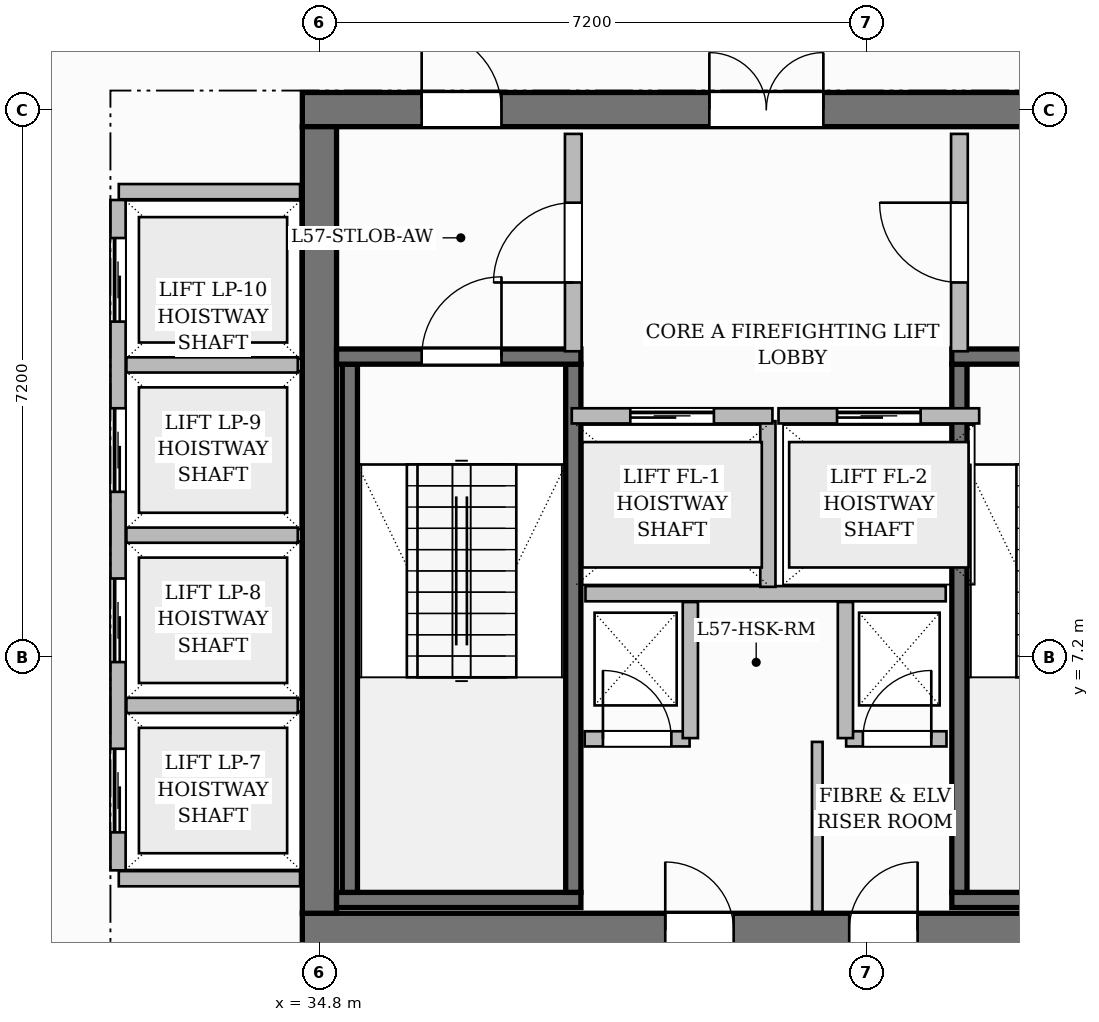
"""IFC4 building model, lengths in metres.
Left out: names, types, materials, properties, quantities, classifications, styles, units other than length and angle.
Written with IfcOpenShell. Run it as: python <this file> out.ifc"""

import sys

from ifc_helpers import new_model, si_unit, direction, frame, frame_2d, origin, place, context, subcontext, project, spatial, rectangle, extrude, source, transform, mapped, element, fill, save


model = new_model("IFC4")
c1 = context("Model", 3, precision=1e-05, world=origin(), true_north=direction((0.0, 1.0)))
c2 = subcontext(c1, "Body", "Model", "MODEL_VIEW")
j1 = project(units=[si_unit("LENGTHUNIT", "METRE"), si_unit("PLANEANGLEUNIT", "RADIAN")], contexts=[c1])
p1 = place(None, origin())
s1 = spatial("IfcSite", under=j1, at=p1, CompositionType="ELEMENT")
p2 = place(p1, origin())
s2 = spatial("IfcBuilding", under=s1, at=p2, CompositionType="ELEMENT")
p3 = place(p2, frame((0.0, 0.0, 228.85)))
s3 = spatial("IfcBuildingStorey", under=s2, at=p3, CompositionType="ELEMENT", Elevation=228.85)
p4 = place(p3, frame((34.575, 3.6, 0.0), z_axis=(0.0, 0.0, 1.0), x_axis=(1.0, 0.0, 0.0)))
e1 = element("IfcWall", 1, at=p4, inside=s3, PredefinedType="SHEAR", context=c2, shape_type="SweptSolid", body=[
    extrude(rectangle(XDim=15.45, YDim=0.45, at=frame_2d((7.725, 0.0))), origin(), (0.0, 0.0, 1.0), 3.85),
])
p5 = place(p4, frame((4.775, 0.0, 0.0)))
e2 = element("IfcOpeningElement", 2, at=p5, cuts=e1, PredefinedType="OPENING", context=c2, shape_type="SweptSolid", body=[
    extrude(rectangle(XDim=0.9, YDim=2.1, at=frame_2d((0.45, 1.05))), frame((0.0, 0.235, 0.0), z_axis=(0.0, -1.0, 0.0), x_axis=(1.0, 0.0, 0.0)), (0.0, 0.0, 1.0), 0.47),
])
p6 = place(p4, frame((7.195, 0.0, 0.0)))
e3 = element("IfcOpeningElement", 3, at=p6, cuts=e1, PredefinedType="OPENING", context=c2, shape_type="SweptSolid", body=[
    extrude(rectangle(XDim=0.9, YDim=2.1, at=frame_2d((0.45, 1.05))), frame((0.0, 0.235, 0.0), z_axis=(0.0, -1.0, 0.0), x_axis=(1.0, 0.0, 0.0)), (0.0, 0.0, 1.0), 0.47),
])
p7 = place(p3, frame((34.575, 14.4, 0.0), z_axis=(0.0, 0.0, 1.0), x_axis=(1.0, 0.0, 0.0)))
e4 = element("IfcWall", 4, at=p7, inside=s3, PredefinedType="SHEAR", context=c2, shape_type="SweptSolid", body=[
    extrude(rectangle(XDim=15.45, YDim=0.45, at=frame_2d((7.725, 0.0))), origin(), (0.0, 0.0, 1.0), 3.85),
])
p8 = place(p7, frame((5.355, 0.0, 0.0)))
e5 = element("IfcOpeningElement", 5, at=p8, cuts=e4, PredefinedType="OPENING", context=c2, shape_type="SweptSolid", body=[
    extrude(rectangle(XDim=1.5, YDim=2.2, at=frame_2d((0.75, 1.1))), frame((0.0, 0.235, 0.0), z_axis=(0.0, -1.0, 0.0), x_axis=(1.0, 0.0, 0.0)), (0.0, 0.0, 1.0), 0.47),
])
p9 = place(p7, frame((1.57, 0.0, 0.0)))
e6 = element("IfcOpeningElement", 6, at=p9, cuts=e4, PredefinedType="OPENING", context=c2, shape_type="SweptSolid", body=[
    extrude(rectangle(XDim=1.05, YDim=2.15, at=frame_2d((0.525, 1.075))), frame((0.0, 0.235, 0.0), z_axis=(0.0, -1.0, 0.0), x_axis=(1.0, 0.0, 0.0)), (0.0, 0.0, 1.0), 0.47),
])
p10 = place(p7, frame((11.2, 0.0, 0.0)))
e7 = element("IfcOpeningElement", 7, at=p10, cuts=e4, PredefinedType="OPENING", context=c2, shape_type="SweptSolid", body=[
    extrude(rectangle(XDim=1.05, YDim=2.15, at=frame_2d((0.525, 1.075))), frame((0.0, 0.235, 0.0), z_axis=(0.0, -1.0, 0.0), x_axis=(1.0, 0.0, 0.0)), (0.0, 0.0, 1.0), 0.47),
])
p11 = place(p3, frame((34.8, 3.825, 0.0), z_axis=(0.0, 0.0, 1.0), x_axis=(0.0, 1.0, 0.0)))
e8 = element("IfcWall", 8, at=p11, inside=s3, PredefinedType="SHEAR", context=c2, shape_type="SweptSolid", body=[
    extrude(rectangle(XDim=10.35, YDim=0.45, at=frame_2d((5.175, 0.0))), origin(), (0.0, 0.0, 1.0), 3.85),
])
p12 = place(p3, frame((35.025, 4.0, 0.0), z_axis=(0.0, 0.0, 1.0), x_axis=(1.0, 0.0, 0.0)))
e9 = element("IfcWall", 9, at=p12, inside=s3, PredefinedType="SHEAR", context=c2, shape_type="SweptSolid", body=[
    extrude(rectangle(XDim=3.215, YDim=0.2, at=frame_2d((1.607, 0.0))), origin(), (0.0, 0.0, 1.0), 3.85),
])
for number, where, z_axis, x_axis in (
    (10, (35.2, 4.1, 0.0), (0.0, 0.0, 1.0), (0.0, 1.0, 0.0)),
    (11, (38.14, 4.1, 0.0), (0.0, 0.0, 1.0), (0.0, 1.0, 0.0)),
):
    element("IfcWall", number, at=place(p3, frame(where, z_axis=z_axis, x_axis=x_axis)), inside=s3, PredefinedType="SHEAR", context=c2, shape_type="SweptSolid", body=[
        extrude(rectangle(XDim=6.95, YDim=0.2, at=frame_2d((3.475, 0.0))), origin(), (0.0, 0.0, 1.0), 3.85),
    ])
p13 = place(p3, frame((35.025, 11.15, 0.0), z_axis=(0.0, 0.0, 1.0), x_axis=(1.0, 0.0, 0.0)))
e12 = element("IfcWall", 12, at=p13, inside=s3, PredefinedType="SHEAR", context=c2, shape_type="SweptSolid", body=[
    extrude(rectangle(XDim=3.215, YDim=0.2, at=frame_2d((1.607, 0.0))), origin(), (0.0, 0.0, 1.0), 3.85),
])
p14 = place(p13, frame((1.12, 0.0, 0.0)))
e13 = element("IfcOpeningElement", 13, at=p14, cuts=e12, PredefinedType="OPENING", context=c2, shape_type="SweptSolid", body=[
    extrude(rectangle(XDim=1.05, YDim=2.2, at=frame_2d((0.525, 1.1))), frame((0.0, 0.11, 0.0), z_axis=(0.0, -1.0, 0.0), x_axis=(1.0, 0.0, 0.0)), (0.0, 0.0, 1.0), 0.22),
])
p15 = place(p3, frame((43.12, 4.0, 0.0), z_axis=(0.0, 0.0, 1.0), x_axis=(1.0, 0.0, 0.0)))
e14 = element("IfcWall", 14, at=p15, inside=s3, PredefinedType="SHEAR", context=c2, shape_type="SweptSolid", body=[
    extrude(rectangle(XDim=6.455, YDim=0.2, at=frame_2d((3.228, 0.0))), origin(), (0.0, 0.0, 1.0), 3.85),
])
p16 = place(p3, frame((43.22, 4.1, 0.0), z_axis=(0.0, 0.0, 1.0), x_axis=(0.0, 1.0, 0.0)))
e15 = element("IfcWall", 15, at=p16, inside=s3, PredefinedType="SHEAR", context=c2, shape_type="SweptSolid", body=[
    extrude(rectangle(XDim=6.95, YDim=0.2, at=frame_2d((3.475, 0.0))), origin(), (0.0, 0.0, 1.0), 3.85),
])
p17 = place(p3, frame((43.12, 11.15, 0.0), z_axis=(0.0, 0.0, 1.0), x_axis=(1.0, 0.0, 0.0)))
e16 = element("IfcWall", 16, at=p17, inside=s3, PredefinedType="SHEAR", context=c2, shape_type="SweptSolid", body=[
    extrude(rectangle(XDim=6.455, YDim=0.2, at=frame_2d((3.228, 0.0))), origin(), (0.0, 0.0, 1.0), 3.85),
])
p18 = place(p17, frame((1.045, 0.0, 0.0)))
e17 = element("IfcOpeningElement", 17, at=p18, cuts=e16, PredefinedType="OPENING", context=c2, shape_type="SweptSolid", body=[
    extrude(rectangle(XDim=1.05, YDim=2.2, at=frame_2d((0.525, 1.1))), frame((0.0, 0.11, 0.0), z_axis=(0.0, -1.0, 0.0), x_axis=(1.0, 0.0, 0.0)), (0.0, 0.0, 1.0), 0.22),
])
p19 = place(p17, frame((4.125, 0.0, 0.0)))
e18 = element("IfcOpeningElement", 18, at=p19, cuts=e16, PredefinedType="OPENING", context=c2, shape_type="SweptSolid", body=[
    extrude(rectangle(XDim=1.05, YDim=2.2, at=frame_2d((0.525, 1.1))), frame((0.0, 0.11, 0.0), z_axis=(0.0, -1.0, 0.0), x_axis=(1.0, 0.0, 0.0)), (0.0, 0.0, 1.0), 0.22),
])
p20 = place(p3, frame((38.3, 8.03, 0.0), z_axis=(0.0, 0.0, 1.0), x_axis=(1.0, 0.0, 0.0)))
e19 = element("IfcWall", 19, at=p20, inside=s3, PredefinedType="PARTITIONING", context=c2, shape_type="SweptSolid", body=[
    extrude(rectangle(XDim=4.74, YDim=0.2, at=frame_2d((2.37, 0.0))), origin(), (0.0, 0.0, 1.0), 3.6),
])
p21 = place(p3, frame((40.7, 8.12, 0.0), z_axis=(0.0, 0.0, 1.0), x_axis=(0.0, 1.0, 0.0)))
e20 = element("IfcWall", 20, at=p21, inside=s3, PredefinedType="PARTITIONING", context=c2, shape_type="SweptSolid", body=[
    extrude(rectangle(XDim=2.18, YDim=0.2, at=frame_2d((1.09, 0.0))), origin(), (0.0, 0.0, 1.0), 3.6),
])
p22 = place(p3, frame((38.14, 11.22, 0.0), z_axis=(0.0, 0.0, 1.0), x_axis=(0.0, 1.0, 0.0)))
e21 = element("IfcWall", 21, at=p22, inside=s3, PredefinedType="PARTITIONING", context=c2, shape_type="SweptSolid", body=[
    extrude(rectangle(XDim=2.86, YDim=0.22, at=frame_2d((1.43, 0.0))), origin(), (0.0, 0.0, 1.0), 3.6),
])
p23 = place(p22, frame((0.905, 0.0, 0.0)))
e22 = element("IfcOpeningElement", 22, at=p23, cuts=e21, PredefinedType="OPENING", context=c2, shape_type="SweptSolid", body=[
    extrude(rectangle(XDim=1.05, YDim=2.15, at=frame_2d((0.525, 1.075))), frame((0.0, 0.12, 0.0), z_axis=(0.0, -1.0, 0.0), x_axis=(1.0, 0.0, 0.0)), (0.0, 0.0, 1.0), 0.24),
])
p24 = place(p3, frame((43.22, 11.22, 0.0), z_axis=(0.0, 0.0, 1.0), x_axis=(0.0, 1.0, 0.0)))
e23 = element("IfcWall", 23, at=p24, inside=s3, PredefinedType="PARTITIONING", context=c2, shape_type="SweptSolid", body=[
    extrude(rectangle(XDim=2.86, YDim=0.22, at=frame_2d((1.43, 0.0))), origin(), (0.0, 0.0, 1.0), 3.6),
])
p25 = place(p24, frame((0.905, 0.0, 0.0)))
e24 = element("IfcOpeningElement", 24, at=p25, cuts=e23, PredefinedType="OPENING", context=c2, shape_type="SweptSolid", body=[
    extrude(rectangle(XDim=1.05, YDim=2.15, at=frame_2d((0.525, 1.075))), frame((0.0, 0.12, 0.0), z_axis=(0.0, -1.0, 0.0), x_axis=(1.0, 0.0, 0.0)), (0.0, 0.0, 1.0), 0.24),
])
p26 = place(p3, frame((38.29, 6.12, 0.0), z_axis=(0.0, 0.0, 1.0), x_axis=(1.0, 0.0, 0.0)))
e25 = element("IfcWall", 25, at=p26, inside=s3, PredefinedType="PARTITIONING", context=c2, shape_type="SweptSolid", body=[
    extrude(rectangle(XDim=1.38, YDim=0.2, at=frame_2d((0.69, 0.0))), origin(), (0.0, 0.0, 1.0), 3.6),
])
p27 = place(p26, frame((0.24, 0.0, 0.0)))
e26 = element("IfcOpeningElement", 26, at=p27, cuts=e25, PredefinedType="OPENING", context=c2, shape_type="SweptSolid", body=[
    extrude(rectangle(XDim=0.9, YDim=2.1, at=frame_2d((0.45, 1.05))), frame((0.0, 0.11, 0.0), z_axis=(0.0, -1.0, 0.0), x_axis=(1.0, 0.0, 0.0)), (0.0, 0.0, 1.0), 0.22),
])
p28 = place(p3, frame((39.68, 6.13, 0.0), z_axis=(0.0, 0.0, 1.0), x_axis=(0.0, 1.0, 0.0)))
e27 = element("IfcWall", 27, at=p28, inside=s3, PredefinedType="PARTITIONING", context=c2, shape_type="SweptSolid", body=[
    extrude(rectangle(XDim=1.79, YDim=0.2, at=frame_2d((0.895, 0.0))), origin(), (0.0, 0.0, 1.0), 3.6),
])
p29 = place(p3, frame((41.73, 6.12, 0.0), z_axis=(0.0, 0.0, 1.0), x_axis=(1.0, 0.0, 0.0)))
e28 = element("IfcWall", 28, at=p29, inside=s3, PredefinedType="PARTITIONING", context=c2, shape_type="SweptSolid", body=[
    extrude(rectangle(XDim=1.32, YDim=0.2, at=frame_2d((0.66, 0.0))), origin(), (0.0, 0.0, 1.0), 3.6),
])
p30 = place(p29, frame((0.22, 0.0, 0.0)))
e29 = element("IfcOpeningElement", 29, at=p30, cuts=e28, PredefinedType="OPENING", context=c2, shape_type="SweptSolid", body=[
    extrude(rectangle(XDim=0.9, YDim=2.1, at=frame_2d((0.45, 1.05))), frame((0.0, 0.11, 0.0), z_axis=(0.0, -1.0, 0.0), x_axis=(1.0, 0.0, 0.0)), (0.0, 0.0, 1.0), 0.22),
])
p31 = place(p3, frame((41.72, 6.13, 0.0), z_axis=(0.0, 0.0, 1.0), x_axis=(0.0, 1.0, 0.0)))
e30 = element("IfcWall", 30, at=p31, inside=s3, PredefinedType="PARTITIONING", context=c2, shape_type="SweptSolid", body=[
    extrude(rectangle(XDim=1.79, YDim=0.2, at=frame_2d((0.895, 0.0))), origin(), (0.0, 0.0, 1.0), 3.6),
])
p32 = place(p3, frame((41.35, 3.845, 0.0), z_axis=(0.0, 0.0, 1.0), x_axis=(0.0, 1.0, 0.0)))
e31 = element("IfcWall", 31, at=p32, inside=s3, PredefinedType="PARTITIONING", context=c2, shape_type="SweptSolid", body=[
    extrude(rectangle(XDim=2.235, YDim=0.14, at=frame_2d((1.118, 0.0))), origin(), (0.0, 0.0, 1.0), 3.6),
])
for number, where, z_axis, x_axis in (
    (32, (32.16, 4.28, 0.0), (0.0, 0.0, 1.0), (1.0, 0.0, 0.0)),
    (33, (32.16, 13.32, 0.0), (0.0, 0.0, 1.0), (1.0, 0.0, 0.0)),
):
    element("IfcWall", number, at=place(p3, frame(where, z_axis=z_axis, x_axis=x_axis)), inside=s3, PredefinedType="PARTITIONING", context=c2, shape_type="SweptSolid", body=[
        extrude(rectangle(XDim=2.385, YDim=0.2, at=frame_2d((1.192, 0.0))), origin(), (0.0, 0.0, 1.0), 3.6),
    ])
p33 = place(p3, frame((32.15, 4.39, 0.0), z_axis=(0.0, 0.0, 1.0), x_axis=(0.0, 1.0, 0.0)))
e34 = element("IfcWall", 34, at=p33, inside=s3, PredefinedType="PARTITIONING", context=c2, shape_type="SweptSolid", body=[
    extrude(rectangle(XDim=8.82, YDim=0.2, at=frame_2d((4.41, 0.0))), origin(), (0.0, 0.0, 1.0), 3.6),
])
p34 = place(p33, frame((0.5, 0.0, 0.0)))
e35 = element("IfcOpeningElement", 35, at=p34, cuts=e34, PredefinedType="OPENING", context=c2, shape_type="SweptSolid", body=[
    extrude(rectangle(XDim=1.1, YDim=2.2, at=frame_2d((0.55, 1.1))), frame((0.0, 0.11, 0.0), z_axis=(0.0, -1.0, 0.0), x_axis=(1.0, 0.0, 0.0)), (0.0, 0.0, 1.0), 0.22),
])
p35 = place(p33, frame((2.74, 0.0, 0.0)))
e36 = element("IfcOpeningElement", 36, at=p35, cuts=e34, PredefinedType="OPENING", context=c2, shape_type="SweptSolid", body=[
    extrude(rectangle(XDim=1.1, YDim=2.2, at=frame_2d((0.55, 1.1))), frame((0.0, 0.11, 0.0), z_axis=(0.0, -1.0, 0.0), x_axis=(1.0, 0.0, 0.0)), (0.0, 0.0, 1.0), 0.22),
])
p36 = place(p33, frame((4.98, 0.0, 0.0)))
e37 = element("IfcOpeningElement", 37, at=p36, cuts=e34, PredefinedType="OPENING", context=c2, shape_type="SweptSolid", body=[
    extrude(rectangle(XDim=1.1, YDim=2.2, at=frame_2d((0.55, 1.1))), frame((0.0, 0.11, 0.0), z_axis=(0.0, -1.0, 0.0), x_axis=(1.0, 0.0, 0.0)), (0.0, 0.0, 1.0), 0.22),
])
p37 = place(p33, frame((7.22, 0.0, 0.0)))
e38 = element("IfcOpeningElement", 38, at=p37, cuts=e34, PredefinedType="OPENING", context=c2, shape_type="SweptSolid", body=[
    extrude(rectangle(XDim=1.1, YDim=2.2, at=frame_2d((0.55, 1.1))), frame((0.0, 0.11, 0.0), z_axis=(0.0, -1.0, 0.0), x_axis=(1.0, 0.0, 0.0)), (0.0, 0.0, 1.0), 0.22),
])
for number, where, z_axis, x_axis in (
    (39, (32.26, 6.56, 0.0), (0.0, 0.0, 1.0), (1.0, 0.0, 0.0)),
    (40, (32.26, 8.8, 0.0), (0.0, 0.0, 1.0), (1.0, 0.0, 0.0)),
    (41, (32.26, 11.04, 0.0), (0.0, 0.0, 1.0), (1.0, 0.0, 0.0)),
):
    element("IfcWall", number, at=place(p3, frame(where, z_axis=z_axis, x_axis=x_axis)), inside=s3, PredefinedType="PARTITIONING", context=c2, shape_type="SweptSolid", body=[
        extrude(rectangle(XDim=2.255, YDim=0.2, at=frame_2d((1.127, 0.0))), origin(), (0.0, 0.0, 1.0), 3.6),
    ])
p38 = place(p3, frame((38.12, 10.37, 0.0), z_axis=(0.0, 0.0, 1.0), x_axis=(1.0, 0.0, 0.0)))
e42 = element("IfcWall", 42, at=p38, inside=s3, PredefinedType="PARTITIONING", context=c2, shape_type="SweptSolid", body=[
    extrude(rectangle(XDim=2.64, YDim=0.2, at=frame_2d((1.32, 0.0))), origin(), (0.0, 0.0, 1.0), 3.6),
])
p39 = place(p38, frame((0.77, 0.0, 0.0)))
e43 = element("IfcOpeningElement", 43, at=p39, cuts=e42, PredefinedType="OPENING", context=c2, shape_type="SweptSolid", body=[
    extrude(rectangle(XDim=1.1, YDim=2.2, at=frame_2d((0.55, 1.1))), frame((0.0, 0.11, 0.0), z_axis=(0.0, -1.0, 0.0), x_axis=(1.0, 0.0, 0.0)), (0.0, 0.0, 1.0), 0.22),
])
p40 = place(p3, frame((40.84, 10.37, 0.0), z_axis=(0.0, 0.0, 1.0), x_axis=(1.0, 0.0, 0.0)))
e44 = element("IfcWall", 44, at=p40, inside=s3, PredefinedType="PARTITIONING", context=c2, shape_type="SweptSolid", body=[
    extrude(rectangle(XDim=2.64, YDim=0.2, at=frame_2d((1.32, 0.0))), origin(), (0.0, 0.0, 1.0), 3.6),
])
p41 = place(p40, frame((0.77, 0.0, 0.0)))
e45 = element("IfcOpeningElement", 45, at=p41, cuts=e44, PredefinedType="OPENING", context=c2, shape_type="SweptSolid", body=[
    extrude(rectangle(XDim=1.1, YDim=2.2, at=frame_2d((0.55, 1.1))), frame((0.0, 0.11, 0.0), z_axis=(0.0, -1.0, 0.0), x_axis=(1.0, 0.0, 0.0)), (0.0, 0.0, 1.0), 0.22),
])
m1 = source(origin(), c2, "Body", "SweptSolid", [
    extrude(rectangle(XDim=1.05, YDim=2.2, at=frame_2d((0.525, 1.1))), frame((0.0, 0.025, 0.0), z_axis=(0.0, -1.0, 0.0), x_axis=(1.0, 0.0, 0.0)), (0.0, 0.0, 1.0), 0.05),
])
p42 = place(p14, origin())
e46 = element("IfcDoor", 46, at=p42, inside=s3, OperationType="SINGLE_SWING_RIGHT", PredefinedType="DOOR", context=c2, shape_type="MappedRepresentation", body=[
    mapped(m1, transform((0.0, 0.0, 0.0), scale=1.0)),
])
fill(e13, e46)
m2 = source(origin(), c2, "Body", "SweptSolid", [
    extrude(rectangle(XDim=1.05, YDim=2.15, at=frame_2d((0.525, 1.075))), frame((0.0, 0.025, 0.0), z_axis=(0.0, -1.0, 0.0), x_axis=(1.0, 0.0, 0.0)), (0.0, 0.0, 1.0), 0.05),
])
p43 = place(p23, origin())
e47 = element("IfcDoor", 47, at=p43, inside=s3, OperationType="SINGLE_SWING_LEFT", PredefinedType="DOOR", context=c2, shape_type="MappedRepresentation", body=[
    mapped(m2, transform((0.0, 0.0, 0.0), scale=1.0)),
])
fill(e22, e47)
p44 = place(p25, origin())
e48 = element("IfcDoor", 48, at=p44, inside=s3, OperationType="SINGLE_SWING_RIGHT", PredefinedType="DOOR", context=c2, shape_type="MappedRepresentation", body=[
    mapped(m2, transform((0.0, 0.0, 0.0), scale=1.0)),
])
fill(e24, e48)
m3 = source(origin(), c2, "Body", "SweptSolid", [
    extrude(rectangle(XDim=1.5, YDim=2.2, at=frame_2d((0.75, 1.1))), frame((0.0, 0.025, 0.0), z_axis=(0.0, -1.0, 0.0), x_axis=(1.0, 0.0, 0.0)), (0.0, 0.0, 1.0), 0.05),
])
p45 = place(p8, origin())
e49 = element("IfcDoor", 49, at=p45, inside=s3, OperationType="DOUBLE_DOOR_SINGLE_SWING", PredefinedType="DOOR", context=c2, shape_type="MappedRepresentation", body=[
    mapped(m3, transform((0.0, 0.0, 0.0), scale=1.0)),
])
fill(e5, e49)
p46 = place(p9, origin())
e50 = element("IfcDoor", 50, at=p46, inside=s3, OperationType="SINGLE_SWING_LEFT", PredefinedType="DOOR", context=c2, shape_type="MappedRepresentation", body=[
    mapped(m2, transform((0.0, 0.0, 0.0), scale=1.0)),
])
fill(e6, e50)
m4 = source(origin(), c2, "Body", "SweptSolid", [
    extrude(rectangle(XDim=0.9, YDim=2.1, at=frame_2d((0.45, 1.05))), frame((0.0, 0.025, 0.0), z_axis=(0.0, -1.0, 0.0), x_axis=(1.0, 0.0, 0.0)), (0.0, 0.0, 1.0), 0.05),
])
p47 = place(p27, origin())
e51 = element("IfcDoor", 51, at=p47, inside=s3, OperationType="SINGLE_SWING_LEFT", PredefinedType="DOOR", context=c2, shape_type="MappedRepresentation", body=[
    mapped(m4, transform((0.0, 0.0, 0.0), scale=1.0)),
])
fill(e26, e51)
p48 = place(p30, origin())
e52 = element("IfcDoor", 52, at=p48, inside=s3, OperationType="SINGLE_SWING_RIGHT", PredefinedType="DOOR", context=c2, shape_type="MappedRepresentation", body=[
    mapped(m4, transform((0.0, 0.0, 0.0), scale=1.0)),
])
fill(e29, e52)
p49 = place(p5, origin())
e53 = element("IfcDoor", 53, at=p49, inside=s3, OperationType="SINGLE_SWING_LEFT", PredefinedType="DOOR", context=c2, shape_type="MappedRepresentation", body=[
    mapped(m4, transform((0.0, 0.0, 0.0), scale=1.0)),
])
fill(e2, e53)
p50 = place(p6, origin())
e54 = element("IfcDoor", 54, at=p50, inside=s3, OperationType="SINGLE_SWING_RIGHT", PredefinedType="DOOR", context=c2, shape_type="MappedRepresentation", body=[
    mapped(m4, transform((0.0, 0.0, 0.0), scale=1.0)),
])
fill(e3, e54)
m5 = source(origin(), c2, "Body", "SweptSolid", [
    extrude(rectangle(XDim=1.1, YDim=2.2, at=frame_2d((0.55, 1.1))), frame((0.0, 0.025, 0.0), z_axis=(0.0, -1.0, 0.0), x_axis=(1.0, 0.0, 0.0)), (0.0, 0.0, 1.0), 0.05),
])
p51 = place(p39, origin())
e55 = element("IfcDoor", 55, at=p51, inside=s3, OperationType="SLIDING_TO_LEFT", PredefinedType="DOOR", context=c2, shape_type="MappedRepresentation", body=[
    mapped(m5, transform((0.0, 0.0, 0.0), scale=1.0)),
])
fill(e43, e55)
p52 = place(p41, origin())
e56 = element("IfcDoor", 56, at=p52, inside=s3, OperationType="SLIDING_TO_LEFT", PredefinedType="DOOR", context=c2, shape_type="MappedRepresentation", body=[
    mapped(m5, transform((0.0, 0.0, 0.0), scale=1.0)),
])
fill(e45, e56)
p53 = place(p34, origin())
e57 = element("IfcDoor", 57, at=p53, inside=s3, OperationType="SLIDING_TO_LEFT", PredefinedType="DOOR", context=c2, shape_type="MappedRepresentation", body=[
    mapped(m5, transform((0.0, 0.0, 0.0), scale=1.0)),
])
fill(e35, e57)
p54 = place(p35, origin())
e58 = element("IfcDoor", 58, at=p54, inside=s3, OperationType="SLIDING_TO_LEFT", PredefinedType="DOOR", context=c2, shape_type="MappedRepresentation", body=[
    mapped(m5, transform((0.0, 0.0, 0.0), scale=1.0)),
])
fill(e36, e58)
p55 = place(p36, origin())
e59 = element("IfcDoor", 59, at=p55, inside=s3, OperationType="SLIDING_TO_LEFT", PredefinedType="DOOR", context=c2, shape_type="MappedRepresentation", body=[
    mapped(m5, transform((0.0, 0.0, 0.0), scale=1.0)),
])
fill(e37, e59)
p56 = place(p37, origin())
e60 = element("IfcDoor", 60, at=p56, inside=s3, OperationType="SLIDING_TO_LEFT", PredefinedType="DOOR", context=c2, shape_type="MappedRepresentation", body=[
    mapped(m5, transform((0.0, 0.0, 0.0), scale=1.0)),
])
fill(e38, e60)
save(model, sys.argv[1])
